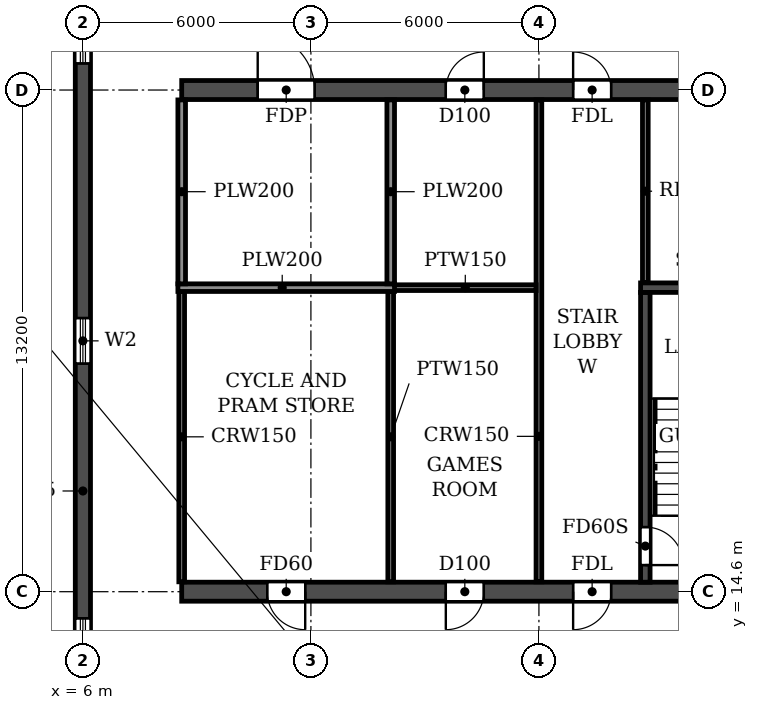
"""IFC4 building model, lengths in metres.
Left out: names, types, materials, properties, quantities, classifications, styles, units other than length and angle.
Written with IfcOpenShell. Run it as: python <this file> out.ifc"""

import sys

from ifc_helpers import new_model, si_unit, direction, frame, frame_2d, origin, place, context, subcontext, project, spatial, rectangle, extrude, element, fill, save


model = new_model("IFC4")
c1 = context("Model", 3, precision=1e-05, world=origin(), true_north=direction((0.0, 1.0)))
c2 = subcontext(c1, "Body", "Model", "MODEL_VIEW")
j1 = project(units=[si_unit("LENGTHUNIT", "METRE"), si_unit("PLANEANGLEUNIT", "RADIAN")], contexts=[c1])
p1 = place(None, origin())
s1 = spatial("IfcSite", under=j1, at=p1, CompositionType="ELEMENT")
p2 = place(p1, origin())
s2 = spatial("IfcBuilding", under=s1, at=p2, CompositionType="ELEMENT")
p3 = place(p2, frame((0.0, 0.0, 76.2)))
s3 = spatial("IfcBuildingStorey", under=s2, at=p3, CompositionType="ELEMENT", Elevation=76.2)
p4 = place(p3, frame((6.0, 4.683, 0.0), z_axis=(0.0, 0.0, 1.0), x_axis=(0.0, 1.0, 0.0)))
e1 = element("IfcWall", 1, at=p4, inside=s3, PredefinedType="SHEAR", context=c2, shape_type="SweptSolid", body=[
    extrude(rectangle(XDim=34.234, YDim=0.4, at=frame_2d((17.117, 0.0))), origin(), (0.0, 0.0, 1.0), 3.06),
])
p5 = place(p4, frame((23.817, 0.0, 0.9)))
e2 = element("IfcOpeningElement", 2, at=p5, cuts=e1, PredefinedType="OPENING", context=c2, shape_type="SweptSolid", body=[
    extrude(rectangle(XDim=1.2, YDim=1.5, at=frame_2d((0.6, 0.75))), frame((0.0, 0.21, 0.0), z_axis=(0.0, -1.0, 0.0), x_axis=(1.0, 0.0, 0.0)), (0.0, 0.0, 1.0), 0.42),
])
p6 = place(p4, frame((8.017, 0.0, 0.9)))
e3 = element("IfcOpeningElement", 3, at=p6, cuts=e1, PredefinedType="OPENING", context=c2, shape_type="SweptSolid", body=[
    extrude(rectangle(XDim=1.2, YDim=1.5, at=frame_2d((0.6, 0.75))), frame((0.0, 0.21, 0.0), z_axis=(0.0, -1.0, 0.0), x_axis=(1.0, 0.0, 0.0)), (0.0, 0.0, 1.0), 0.42),
])
p7 = place(p4, frame((15.917, 0.0, 0.9)))
e4 = element("IfcOpeningElement", 4, at=p7, cuts=e1, PredefinedType="OPENING", context=c2, shape_type="SweptSolid", body=[
    extrude(rectangle(XDim=1.2, YDim=1.5, at=frame_2d((0.6, 0.75))), frame((0.0, 0.21, 0.0), z_axis=(0.0, -1.0, 0.0), x_axis=(1.0, 0.0, 0.0)), (0.0, 0.0, 1.0), 0.42),
])
p8 = place(p4, frame((28.894, 0.0, 0.6)))
e5 = element("IfcOpeningElement", 5, at=p8, cuts=e1, PredefinedType="OPENING", context=c2, shape_type="SweptSolid", body=[
    extrude(rectangle(XDim=2.2, YDim=1.8, at=frame_2d((1.1, 0.9))), frame((0.0, 0.21, 0.0), z_axis=(0.0, -1.0, 0.0), x_axis=(1.0, 0.0, 0.0)), (0.0, 0.0, 1.0), 0.42),
])
p9 = place(p4, frame((2.541, 0.0, 0.6)))
e6 = element("IfcOpeningElement", 6, at=p9, cuts=e1, PredefinedType="OPENING", context=c2, shape_type="SweptSolid", body=[
    extrude(rectangle(XDim=2.2, YDim=1.8, at=frame_2d((1.1, 0.9))), frame((0.0, 0.21, 0.0), z_axis=(0.0, -1.0, 0.0), x_axis=(1.0, 0.0, 0.0)), (0.0, 0.0, 1.0), 0.42),
])
p10 = place(p3, frame((8.6, 14.6, 0.0), z_axis=(0.0, 0.0, 1.0), x_axis=(1.0, 0.0, 0.0)))
e7 = element("IfcWall", 7, at=p10, inside=s3, PredefinedType="SOLIDWALL", context=c2, shape_type="SweptSolid", body=[
    extrude(rectangle(XDim=84.8, YDim=0.5, at=frame_2d((42.4, 0.0))), origin(), (0.0, 0.0, 1.0), 3.06),
])
p11 = place(p10, frame((2.25, 0.0, 0.0)))
e8 = element("IfcOpeningElement", 8, at=p11, cuts=e7, PredefinedType="OPENING", context=c2, shape_type="SweptSolid", body=[
    extrude(rectangle(XDim=1.0, YDim=2.1, at=frame_2d((0.5, 1.05))), frame((0.0, 0.26, 0.0), z_axis=(0.0, -1.0, 0.0), x_axis=(1.0, 0.0, 0.0)), (0.0, 0.0, 1.0), 0.52),
])
p12 = place(p10, frame((6.95, 0.0, 0.0)))
e9 = element("IfcOpeningElement", 9, at=p12, cuts=e7, PredefinedType="OPENING", context=c2, shape_type="SweptSolid", body=[
    extrude(rectangle(XDim=1.0, YDim=2.1, at=frame_2d((0.5, 1.05))), frame((0.0, 0.26, 0.0), z_axis=(0.0, -1.0, 0.0), x_axis=(1.0, 0.0, 0.0)), (0.0, 0.0, 1.0), 0.52),
])
p13 = place(p10, frame((10.3, 0.0, 0.0)))
e10 = element("IfcOpeningElement", 10, at=p13, cuts=e7, PredefinedType="OPENING", context=c2, shape_type="SweptSolid", body=[
    extrude(rectangle(XDim=1.0, YDim=2.1, at=frame_2d((0.5, 1.05))), frame((0.0, 0.26, 0.0), z_axis=(0.0, -1.0, 0.0), x_axis=(1.0, 0.0, 0.0)), (0.0, 0.0, 1.0), 0.52),
])
p14 = place(p10, frame((18.2, 0.0, 0.0)))
e11 = element("IfcOpeningElement", 11, at=p14, cuts=e7, PredefinedType="OPENING", context=c2, shape_type="SweptSolid", body=[
    extrude(rectangle(XDim=1.0, YDim=2.1, at=frame_2d((0.5, 1.05))), frame((0.0, 0.26, 0.0), z_axis=(0.0, -1.0, 0.0), x_axis=(1.0, 0.0, 0.0)), (0.0, 0.0, 1.0), 0.52),
])
p15 = place(p10, frame((22.8, 0.0, 0.0)))
e12 = element("IfcOpeningElement", 12, at=p15, cuts=e7, PredefinedType="OPENING", context=c2, shape_type="SweptSolid", body=[
    extrude(rectangle(XDim=1.0, YDim=2.1, at=frame_2d((0.5, 1.05))), frame((0.0, 0.26, 0.0), z_axis=(0.0, -1.0, 0.0), x_axis=(1.0, 0.0, 0.0)), (0.0, 0.0, 1.0), 0.52),
])
p16 = place(p10, frame((35.4, 0.0, 0.0)))
e13 = element("IfcOpeningElement", 13, at=p16, cuts=e7, PredefinedType="OPENING", context=c2, shape_type="SweptSolid", body=[
    extrude(rectangle(XDim=1.0, YDim=2.1, at=frame_2d((0.5, 1.05))), frame((0.0, 0.26, 0.0), z_axis=(0.0, -1.0, 0.0), x_axis=(1.0, 0.0, 0.0)), (0.0, 0.0, 1.0), 0.52),
])
p17 = place(p10, frame((39.3, 0.0, 0.0)))
e14 = element("IfcOpeningElement", 14, at=p17, cuts=e7, PredefinedType="OPENING", context=c2, shape_type="SweptSolid", body=[
    extrude(rectangle(XDim=1.0, YDim=2.1, at=frame_2d((0.5, 1.05))), frame((0.0, 0.26, 0.0), z_axis=(0.0, -1.0, 0.0), x_axis=(1.0, 0.0, 0.0)), (0.0, 0.0, 1.0), 0.52),
])
p18 = place(p10, frame((41.9, 0.0, 0.0)))
e15 = element("IfcOpeningElement", 15, at=p18, cuts=e7, PredefinedType="OPENING", context=c2, shape_type="SweptSolid", body=[
    extrude(rectangle(XDim=1.0, YDim=2.1, at=frame_2d((0.5, 1.05))), frame((0.0, 0.26, 0.0), z_axis=(0.0, -1.0, 0.0), x_axis=(1.0, 0.0, 0.0)), (0.0, 0.0, 1.0), 0.52),
])
p19 = place(p10, frame((44.5, 0.0, 0.0)))
e16 = element("IfcOpeningElement", 16, at=p19, cuts=e7, PredefinedType="OPENING", context=c2, shape_type="SweptSolid", body=[
    extrude(rectangle(XDim=1.0, YDim=2.1, at=frame_2d((0.5, 1.05))), frame((0.0, 0.26, 0.0), z_axis=(0.0, -1.0, 0.0), x_axis=(1.0, 0.0, 0.0)), (0.0, 0.0, 1.0), 0.52),
])
p20 = place(p10, frame((48.4, 0.0, 0.0)))
e17 = element("IfcOpeningElement", 17, at=p20, cuts=e7, PredefinedType="OPENING", context=c2, shape_type="SweptSolid", body=[
    extrude(rectangle(XDim=1.0, YDim=2.1, at=frame_2d((0.5, 1.05))), frame((0.0, 0.26, 0.0), z_axis=(0.0, -1.0, 0.0), x_axis=(1.0, 0.0, 0.0)), (0.0, 0.0, 1.0), 0.52),
])
p21 = place(p10, frame((61.0, 0.0, 0.0)))
e18 = element("IfcOpeningElement", 18, at=p21, cuts=e7, PredefinedType="OPENING", context=c2, shape_type="SweptSolid", body=[
    extrude(rectangle(XDim=1.0, YDim=2.1, at=frame_2d((0.5, 1.05))), frame((0.0, 0.26, 0.0), z_axis=(0.0, -1.0, 0.0), x_axis=(1.0, 0.0, 0.0)), (0.0, 0.0, 1.0), 0.52),
])
p22 = place(p10, frame((65.6, 0.0, 0.0)))
e19 = element("IfcOpeningElement", 19, at=p22, cuts=e7, PredefinedType="OPENING", context=c2, shape_type="SweptSolid", body=[
    extrude(rectangle(XDim=1.0, YDim=2.1, at=frame_2d((0.5, 1.05))), frame((0.0, 0.26, 0.0), z_axis=(0.0, -1.0, 0.0), x_axis=(1.0, 0.0, 0.0)), (0.0, 0.0, 1.0), 0.52),
])
p23 = place(p10, frame((73.5, 0.0, 0.0)))
e20 = element("IfcOpeningElement", 20, at=p23, cuts=e7, PredefinedType="OPENING", context=c2, shape_type="SweptSolid", body=[
    extrude(rectangle(XDim=1.0, YDim=2.1, at=frame_2d((0.5, 1.05))), frame((0.0, 0.26, 0.0), z_axis=(0.0, -1.0, 0.0), x_axis=(1.0, 0.0, 0.0)), (0.0, 0.0, 1.0), 0.52),
])
p24 = place(p10, frame((76.55, 0.0, 0.0)))
e21 = element("IfcOpeningElement", 21, at=p24, cuts=e7, PredefinedType="OPENING", context=c2, shape_type="SweptSolid", body=[
    extrude(rectangle(XDim=1.0, YDim=2.1, at=frame_2d((0.5, 1.05))), frame((0.0, 0.26, 0.0), z_axis=(0.0, -1.0, 0.0), x_axis=(1.0, 0.0, 0.0)), (0.0, 0.0, 1.0), 0.52),
])
p25 = place(p10, frame((81.0, 0.0, 0.0)))
e22 = element("IfcOpeningElement", 22, at=p25, cuts=e7, PredefinedType="OPENING", context=c2, shape_type="SweptSolid", body=[
    extrude(rectangle(XDim=1.5, YDim=2.1, at=frame_2d((0.75, 1.05))), frame((0.0, 0.26, 0.0), z_axis=(0.0, -1.0, 0.0), x_axis=(1.0, 0.0, 0.0)), (0.0, 0.0, 1.0), 0.52),
])
p26 = place(p3, frame((8.6, 27.8, 0.0), z_axis=(0.0, 0.0, 1.0), x_axis=(1.0, 0.0, 0.0)))
e23 = element("IfcWall", 23, at=p26, inside=s3, PredefinedType="SOLIDWALL", context=c2, shape_type="SweptSolid", body=[
    extrude(rectangle(XDim=84.8, YDim=0.5, at=frame_2d((42.4, 0.0))), origin(), (0.0, 0.0, 1.0), 3.06),
])
p27 = place(p26, frame((2.0, 0.0, 0.0)))
e24 = element("IfcOpeningElement", 24, at=p27, cuts=e23, PredefinedType="OPENING", context=c2, shape_type="SweptSolid", body=[
    extrude(rectangle(XDim=1.5, YDim=2.1, at=frame_2d((0.75, 1.05))), frame((0.0, 0.26, 0.0), z_axis=(0.0, -1.0, 0.0), x_axis=(1.0, 0.0, 0.0)), (0.0, 0.0, 1.0), 0.52),
])
p28 = place(p26, frame((6.95, 0.0, 0.0)))
e25 = element("IfcOpeningElement", 25, at=p28, cuts=e23, PredefinedType="OPENING", context=c2, shape_type="SweptSolid", body=[
    extrude(rectangle(XDim=1.0, YDim=2.1, at=frame_2d((0.5, 1.05))), frame((0.0, 0.26, 0.0), z_axis=(0.0, -1.0, 0.0), x_axis=(1.0, 0.0, 0.0)), (0.0, 0.0, 1.0), 0.52),
])
p29 = place(p26, frame((10.3, 0.0, 0.0)))
e26 = element("IfcOpeningElement", 26, at=p29, cuts=e23, PredefinedType="OPENING", context=c2, shape_type="SweptSolid", body=[
    extrude(rectangle(XDim=1.0, YDim=2.1, at=frame_2d((0.5, 1.05))), frame((0.0, 0.26, 0.0), z_axis=(0.0, -1.0, 0.0), x_axis=(1.0, 0.0, 0.0)), (0.0, 0.0, 1.0), 0.52),
])
p30 = place(p26, frame((13.65, 0.0, 0.0)))
e27 = element("IfcOpeningElement", 27, at=p30, cuts=e23, PredefinedType="OPENING", context=c2, shape_type="SweptSolid", body=[
    extrude(rectangle(XDim=0.9, YDim=2.1, at=frame_2d((0.45, 1.05))), frame((0.0, 0.26, 0.0), z_axis=(0.0, -1.0, 0.0), x_axis=(1.0, 0.0, 0.0)), (0.0, 0.0, 1.0), 0.52),
])
p31 = place(p26, frame((22.85, 0.0, 0.0)))
e28 = element("IfcOpeningElement", 28, at=p31, cuts=e23, PredefinedType="OPENING", context=c2, shape_type="SweptSolid", body=[
    extrude(rectangle(XDim=0.9, YDim=2.1, at=frame_2d((0.45, 1.05))), frame((0.0, 0.26, 0.0), z_axis=(0.0, -1.0, 0.0), x_axis=(1.0, 0.0, 0.0)), (0.0, 0.0, 1.0), 0.52),
])
p32 = place(p26, frame((26.0, 0.0, 0.0)))
e29 = element("IfcOpeningElement", 29, at=p32, cuts=e23, PredefinedType="OPENING", context=c2, shape_type="SweptSolid", body=[
    extrude(rectangle(XDim=1.0, YDim=2.1, at=frame_2d((0.5, 1.05))), frame((0.0, 0.26, 0.0), z_axis=(0.0, -1.0, 0.0), x_axis=(1.0, 0.0, 0.0)), (0.0, 0.0, 1.0), 0.52),
])
p33 = place(p26, frame((31.2, 0.0, 0.0)))
e30 = element("IfcOpeningElement", 30, at=p33, cuts=e23, PredefinedType="OPENING", context=c2, shape_type="SweptSolid", body=[
    extrude(rectangle(XDim=1.0, YDim=2.1, at=frame_2d((0.5, 1.05))), frame((0.0, 0.26, 0.0), z_axis=(0.0, -1.0, 0.0), x_axis=(1.0, 0.0, 0.0)), (0.0, 0.0, 1.0), 0.52),
])
p34 = place(p26, frame((39.0, 0.0, 0.0)))
e31 = element("IfcOpeningElement", 31, at=p34, cuts=e23, PredefinedType="OPENING", context=c2, shape_type="SweptSolid", body=[
    extrude(rectangle(XDim=1.0, YDim=2.1, at=frame_2d((0.5, 1.05))), frame((0.0, 0.26, 0.0), z_axis=(0.0, -1.0, 0.0), x_axis=(1.0, 0.0, 0.0)), (0.0, 0.0, 1.0), 0.52),
])
p35 = place(p26, frame((41.9, 0.0, 0.0)))
e32 = element("IfcOpeningElement", 32, at=p35, cuts=e23, PredefinedType="OPENING", context=c2, shape_type="SweptSolid", body=[
    extrude(rectangle(XDim=1.0, YDim=2.1, at=frame_2d((0.5, 1.05))), frame((0.0, 0.26, 0.0), z_axis=(0.0, -1.0, 0.0), x_axis=(1.0, 0.0, 0.0)), (0.0, 0.0, 1.0), 0.52),
])
p36 = place(p26, frame((44.8, 0.0, 0.0)))
e33 = element("IfcOpeningElement", 33, at=p36, cuts=e23, PredefinedType="OPENING", context=c2, shape_type="SweptSolid", body=[
    extrude(rectangle(XDim=1.0, YDim=2.1, at=frame_2d((0.5, 1.05))), frame((0.0, 0.26, 0.0), z_axis=(0.0, -1.0, 0.0), x_axis=(1.0, 0.0, 0.0)), (0.0, 0.0, 1.0), 0.52),
])
p37 = place(p26, frame((48.7, 0.0, 0.0)))
e34 = element("IfcOpeningElement", 34, at=p37, cuts=e23, PredefinedType="OPENING", context=c2, shape_type="SweptSolid", body=[
    extrude(rectangle(XDim=1.0, YDim=2.1, at=frame_2d((0.5, 1.05))), frame((0.0, 0.26, 0.0), z_axis=(0.0, -1.0, 0.0), x_axis=(1.0, 0.0, 0.0)), (0.0, 0.0, 1.0), 0.52),
])
p38 = place(p26, frame((55.2, 0.0, 0.0)))
e35 = element("IfcOpeningElement", 35, at=p38, cuts=e23, PredefinedType="OPENING", context=c2, shape_type="SweptSolid", body=[
    extrude(rectangle(XDim=1.0, YDim=2.1, at=frame_2d((0.5, 1.05))), frame((0.0, 0.26, 0.0), z_axis=(0.0, -1.0, 0.0), x_axis=(1.0, 0.0, 0.0)), (0.0, 0.0, 1.0), 0.52),
])
p39 = place(p26, frame((61.05, 0.0, 0.0)))
e36 = element("IfcOpeningElement", 36, at=p39, cuts=e23, PredefinedType="OPENING", context=c2, shape_type="SweptSolid", body=[
    extrude(rectangle(XDim=0.9, YDim=2.1, at=frame_2d((0.45, 1.05))), frame((0.0, 0.26, 0.0), z_axis=(0.0, -1.0, 0.0), x_axis=(1.0, 0.0, 0.0)), (0.0, 0.0, 1.0), 0.52),
])
p40 = place(p26, frame((70.25, 0.0, 0.0)))
e37 = element("IfcOpeningElement", 37, at=p40, cuts=e23, PredefinedType="OPENING", context=c2, shape_type="SweptSolid", body=[
    extrude(rectangle(XDim=0.9, YDim=2.1, at=frame_2d((0.45, 1.05))), frame((0.0, 0.26, 0.0), z_axis=(0.0, -1.0, 0.0), x_axis=(1.0, 0.0, 0.0)), (0.0, 0.0, 1.0), 0.52),
])
p41 = place(p26, frame((73.5, 0.0, 0.0)))
e38 = element("IfcOpeningElement", 38, at=p41, cuts=e23, PredefinedType="OPENING", context=c2, shape_type="SweptSolid", body=[
    extrude(rectangle(XDim=1.0, YDim=2.1, at=frame_2d((0.5, 1.05))), frame((0.0, 0.26, 0.0), z_axis=(0.0, -1.0, 0.0), x_axis=(1.0, 0.0, 0.0)), (0.0, 0.0, 1.0), 0.52),
])
p42 = place(p26, frame((76.25, 0.0, 0.0)))
e39 = element("IfcOpeningElement", 39, at=p42, cuts=e23, PredefinedType="OPENING", context=c2, shape_type="SweptSolid", body=[
    extrude(rectangle(XDim=1.0, YDim=2.1, at=frame_2d((0.5, 1.05))), frame((0.0, 0.26, 0.0), z_axis=(0.0, -1.0, 0.0), x_axis=(1.0, 0.0, 0.0)), (0.0, 0.0, 1.0), 0.52),
])
p43 = place(p26, frame((80.95, 0.0, 0.0)))
e40 = element("IfcOpeningElement", 40, at=p43, cuts=e23, PredefinedType="OPENING", context=c2, shape_type="SweptSolid", body=[
    extrude(rectangle(XDim=1.0, YDim=2.1, at=frame_2d((0.5, 1.05))), frame((0.0, 0.26, 0.0), z_axis=(0.0, -1.0, 0.0), x_axis=(1.0, 0.0, 0.0)), (0.0, 0.0, 1.0), 0.52),
])
p44 = place(p3, frame((20.8, 14.85, 0.0), z_axis=(0.0, 0.0, 1.0), x_axis=(0.0, 1.0, 0.0)))
e41 = element("IfcWall", 41, at=p44, inside=s3, PredefinedType="SOLIDWALL", context=c2, shape_type="SweptSolid", body=[
    extrude(rectangle(XDim=7.625, YDim=0.25, at=frame_2d((3.812, 0.0))), origin(), (0.0, 0.0, 1.0), 3.06),
])
p45 = place(p44, frame((0.45, 0.0, 0.0)))
e42 = element("IfcOpeningElement", 42, at=p45, cuts=e41, PredefinedType="OPENING", context=c2, shape_type="SweptSolid", body=[
    extrude(rectangle(XDim=1.0, YDim=2.1, at=frame_2d((0.5, 1.05))), frame((0.0, 0.135, 0.0), z_axis=(0.0, -1.0, 0.0), x_axis=(1.0, 0.0, 0.0)), (0.0, 0.0, 1.0), 0.27),
])
p46 = place(p3, frame((20.675, 22.6, 0.0), z_axis=(0.0, 0.0, 1.0), x_axis=(1.0, 0.0, 0.0)))
e43 = element("IfcWall", 43, at=p46, inside=s3, PredefinedType="SOLIDWALL", context=c2, shape_type="SweptSolid", body=[
    extrude(rectangle(XDim=4.05, YDim=0.25, at=frame_2d((2.025, 0.0))), origin(), (0.0, 0.0, 1.0), 3.06),
])
p47 = place(p3, frame((8.6, 14.86, 0.0), z_axis=(0.0, 0.0, 1.0), x_axis=(0.0, 1.0, 0.0)))
e44 = element("IfcWall", 44, at=p47, inside=s3, PredefinedType="PARTITIONING", context=c2, shape_type="SweptSolid", body=[
    extrude(rectangle(XDim=7.64, YDim=0.15, at=frame_2d((3.82, 0.0))), origin(), (0.0, 0.0, 1.0), 3.06),
])
p48 = place(p3, frame((18.0, 14.86, 0.0), z_axis=(0.0, 0.0, 1.0), x_axis=(0.0, 1.0, 0.0)))
e45 = element("IfcWall", 45, at=p48, inside=s3, PredefinedType="PARTITIONING", context=c2, shape_type="SweptSolid", body=[
    extrude(rectangle(XDim=12.68, YDim=0.15, at=frame_2d((6.34, 0.0))), origin(), (0.0, 0.0, 1.0), 3.06),
])
p49 = place(p3, frame((14.0, 22.6, 0.0), z_axis=(0.0, 0.0, 1.0), x_axis=(1.0, 0.0, 0.0)))
e46 = element("IfcWall", 46, at=p49, inside=s3, PredefinedType="PARTITIONING", context=c2, shape_type="SweptSolid", body=[
    extrude(rectangle(XDim=3.925, YDim=0.15, at=frame_2d((1.962, 0.0))), origin(), (0.0, 0.0, 1.0), 3.06),
])
p50 = place(p3, frame((14.1, 14.86, 0.0), z_axis=(0.0, 0.0, 1.0), x_axis=(0.0, 1.0, 0.0)))
e47 = element("IfcWall", 47, at=p50, inside=s3, PredefinedType="PARTITIONING", context=c2, shape_type="SweptSolid", body=[
    extrude(rectangle(XDim=7.64, YDim=0.15, at=frame_2d((3.82, 0.0))), origin(), (0.0, 0.0, 1.0), 3.06),
])
p51 = place(p3, frame((8.5, 22.6, 0.0), z_axis=(0.0, 0.0, 1.0), x_axis=(1.0, 0.0, 0.0)))
e48 = element("IfcWall", 48, at=p51, inside=s3, PredefinedType="PARTITIONING", context=c2, shape_type="SweptSolid", body=[
    extrude(rectangle(XDim=5.7, YDim=0.2, at=frame_2d((2.85, 0.0))), origin(), (0.0, 0.0, 1.0), 3.06),
])
for number, where, z_axis, x_axis in (
    (49, (8.6, 22.7, 0.0), (0.0, 0.0, 1.0), (0.0, 1.0, 0.0)),
    (50, (14.1, 22.7, 0.0), (0.0, 0.0, 1.0), (0.0, 1.0, 0.0)),
):
    element("IfcWall", number, at=place(p3, frame(where, z_axis=z_axis, x_axis=x_axis)), inside=s3, PredefinedType="PARTITIONING", context=c2, shape_type="SweptSolid", body=[
        extrude(rectangle(XDim=4.84, YDim=0.2, at=frame_2d((2.42, 0.0))), origin(), (0.0, 0.0, 1.0), 3.06),
    ])
p52 = place(p3, frame((20.8, 22.735, 0.0), z_axis=(0.0, 0.0, 1.0), x_axis=(0.0, 1.0, 0.0)))
e51 = element("IfcWall", 51, at=p52, inside=s3, PredefinedType="PARTITIONING", context=c2, shape_type="SweptSolid", body=[
    extrude(rectangle(XDim=4.805, YDim=0.15, at=frame_2d((2.402, 0.0))), origin(), (0.0, 0.0, 1.0), 3.06),
])
p53 = place(p5, origin())
e52 = element("IfcWindow", 52, at=p53, inside=s3, PartitioningType="SINGLE_PANEL", PredefinedType="WINDOW", context=c2, shape_type="SweptSolid", body=[
    extrude(rectangle(XDim=1.2, YDim=1.5, at=frame_2d((0.6, 0.75))), frame((0.0, 0.03, 0.0), z_axis=(0.0, -1.0, 0.0), x_axis=(1.0, 0.0, 0.0)), (0.0, 0.0, 1.0), 0.06),
])
fill(e2, e52)
p54 = place(p6, origin())
e53 = element("IfcWindow", 53, at=p54, inside=s3, PartitioningType="SINGLE_PANEL", PredefinedType="WINDOW", context=c2, shape_type="SweptSolid", body=[
    extrude(rectangle(XDim=1.2, YDim=1.5, at=frame_2d((0.6, 0.75))), frame((0.0, 0.03, 0.0), z_axis=(0.0, -1.0, 0.0), x_axis=(1.0, 0.0, 0.0)), (0.0, 0.0, 1.0), 0.06),
])
fill(e3, e53)
p55 = place(p7, origin())
e54 = element("IfcWindow", 54, at=p55, inside=s3, PartitioningType="SINGLE_PANEL", PredefinedType="WINDOW", context=c2, shape_type="SweptSolid", body=[
    extrude(rectangle(XDim=1.2, YDim=1.5, at=frame_2d((0.6, 0.75))), frame((0.0, 0.03, 0.0), z_axis=(0.0, -1.0, 0.0), x_axis=(1.0, 0.0, 0.0)), (0.0, 0.0, 1.0), 0.06),
])
fill(e4, e54)
p56 = place(p27, origin())
e55 = element("IfcDoor", 55, at=p56, inside=s3, OperationType="DOUBLE_DOOR_SINGLE_SWING", PredefinedType="DOOR", context=c2, shape_type="SweptSolid", body=[
    extrude(rectangle(XDim=1.5, YDim=2.1, at=frame_2d((0.75, 1.05))), frame((0.0, 0.025, 0.0), z_axis=(0.0, -1.0, 0.0), x_axis=(1.0, 0.0, 0.0)), (0.0, 0.0, 1.0), 0.05),
])
fill(e24, e55)
p57 = place(p28, origin())
e56 = element("IfcDoor", 56, at=p57, inside=s3, OperationType="SINGLE_SWING_RIGHT", PredefinedType="DOOR", context=c2, shape_type="SweptSolid", body=[
    extrude(rectangle(XDim=1.0, YDim=2.1, at=frame_2d((0.5, 1.05))), frame((0.0, 0.025, 0.0), z_axis=(0.0, -1.0, 0.0), x_axis=(1.0, 0.0, 0.0)), (0.0, 0.0, 1.0), 0.05),
])
fill(e25, e56)
p58 = place(p29, origin())
e57 = element("IfcDoor", 57, at=p58, inside=s3, OperationType="SINGLE_SWING_LEFT", PredefinedType="DOOR", context=c2, shape_type="SweptSolid", body=[
    extrude(rectangle(XDim=1.0, YDim=2.1, at=frame_2d((0.5, 1.05))), frame((0.0, 0.025, 0.0), z_axis=(0.0, -1.0, 0.0), x_axis=(1.0, 0.0, 0.0)), (0.0, 0.0, 1.0), 0.05),
])
fill(e26, e57)
p59 = place(p11, frame((1.0, 0.0, 0.0), z_axis=(0.0, 0.0, 1.0), x_axis=(-1.0, 0.0, 0.0)))
e58 = element("IfcDoor", 58, at=p59, inside=s3, OperationType="SINGLE_SWING_LEFT", PredefinedType="DOOR", context=c2, shape_type="SweptSolid", body=[
    extrude(rectangle(XDim=1.0, YDim=2.1, at=frame_2d((0.5, 1.05))), frame((0.0, 0.025, 0.0), z_axis=(0.0, -1.0, 0.0), x_axis=(1.0, 0.0, 0.0)), (0.0, 0.0, 1.0), 0.05),
])
fill(e8, e58)
p60 = place(p12, frame((1.0, 0.0, 0.0), z_axis=(0.0, 0.0, 1.0), x_axis=(-1.0, 0.0, 0.0)))
e59 = element("IfcDoor", 59, at=p60, inside=s3, OperationType="SINGLE_SWING_RIGHT", PredefinedType="DOOR", context=c2, shape_type="SweptSolid", body=[
    extrude(rectangle(XDim=1.0, YDim=2.1, at=frame_2d((0.5, 1.05))), frame((0.0, 0.025, 0.0), z_axis=(0.0, -1.0, 0.0), x_axis=(1.0, 0.0, 0.0)), (0.0, 0.0, 1.0), 0.05),
])
fill(e9, e59)
p61 = place(p13, frame((1.0, 0.0, 0.0), z_axis=(0.0, 0.0, 1.0), x_axis=(-1.0, 0.0, 0.0)))
e60 = element("IfcDoor", 60, at=p61, inside=s3, OperationType="SINGLE_SWING_RIGHT", PredefinedType="DOOR", context=c2, shape_type="SweptSolid", body=[
    extrude(rectangle(XDim=1.0, YDim=2.1, at=frame_2d((0.5, 1.05))), frame((0.0, 0.025, 0.0), z_axis=(0.0, -1.0, 0.0), x_axis=(1.0, 0.0, 0.0)), (0.0, 0.0, 1.0), 0.05),
])
fill(e10, e60)
p62 = place(p45, frame((1.0, 0.0, 0.0), z_axis=(0.0, 0.0, 1.0), x_axis=(-1.0, 0.0, 0.0)))
e61 = element("IfcDoor", 61, at=p62, inside=s3, OperationType="SINGLE_SWING_RIGHT", PredefinedType="DOOR", context=c2, shape_type="SweptSolid", body=[
    extrude(rectangle(XDim=1.0, YDim=2.1, at=frame_2d((0.5, 1.05))), frame((0.0, 0.025, 0.0), z_axis=(0.0, -1.0, 0.0), x_axis=(1.0, 0.0, 0.0)), (0.0, 0.0, 1.0), 0.05),
])
fill(e42, e61)
save(model, sys.argv[1])
